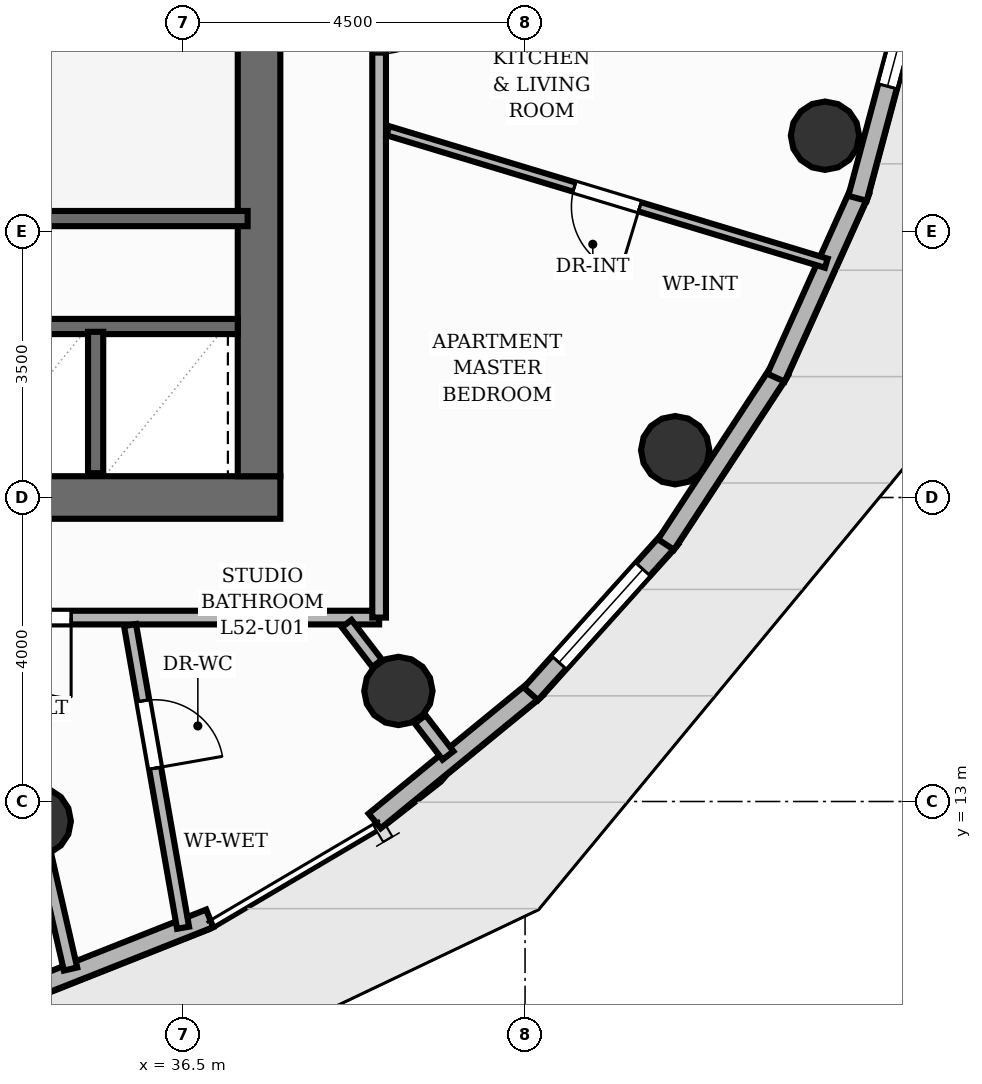
"""IFC4 building model, lengths in metres.
Left out: names, types, materials, properties, quantities, classifications, styles, units other than length and angle.
Written with IfcOpenShell. Run it as: python <this file> out.ifc"""

import sys

from ifc_helpers import new_model, si_unit, direction, frame, frame_2d, origin, origin_2d, place, context, subcontext, project, spatial, rectangle, circle, extrude, element, fill, save


model = new_model("IFC4")
c1 = context("Model", 3, precision=1e-05, world=origin(), true_north=direction((0.0, 1.0)))
c2 = subcontext(c1, "Body", "Model", "MODEL_VIEW")
j1 = project(units=[si_unit("LENGTHUNIT", "METRE"), si_unit("PLANEANGLEUNIT", "RADIAN")], contexts=[c1])
p1 = place(None, origin())
s1 = spatial("IfcSite", under=j1, at=p1, CompositionType="ELEMENT")
p2 = place(p1, origin())
s2 = spatial("IfcBuilding", under=s1, at=p2, CompositionType="ELEMENT")
p3 = place(p2, frame((0.0, 0.0, 175.84)))
s3 = spatial("IfcBuildingStorey", under=s2, at=p3, CompositionType="ELEMENT", Elevation=175.84)
p4 = place(p3, frame((26.22, 17.0, 0.0), z_axis=(0.0, 0.0, 1.0), x_axis=(1.0, 0.0, 0.0)))
e1 = element("IfcWall", 1, at=p4, inside=s3, PredefinedType="SHEAR", context=c2, shape_type="SweptSolid", body=[
    extrude(rectangle(XDim=11.56, YDim=0.56, at=frame_2d((5.78, 0.0))), origin(), (0.0, 0.0, 1.0), 3.2),
])
p5 = place(p4, frame((2.28, 0.0, 0.0)))
e2 = element("IfcOpeningElement", 2, at=p5, cuts=e1, PredefinedType="OPENING", context=c2, shape_type="SweptSolid", body=[
    extrude(rectangle(XDim=1.1, YDim=2.15, at=frame_2d((0.55, 1.075))), frame((0.0, 0.29, 0.0), z_axis=(0.0, -1.0, 0.0), x_axis=(1.0, 0.0, 0.0)), (0.0, 0.0, 1.0), 0.58),
])
p6 = place(p4, frame((5.83, 0.0, 0.0)))
e3 = element("IfcOpeningElement", 3, at=p6, cuts=e1, PredefinedType="OPENING", context=c2, shape_type="SweptSolid", body=[
    extrude(rectangle(XDim=0.9, YDim=2.1, at=frame_2d((0.45, 1.05))), frame((0.0, 0.29, 0.0), z_axis=(0.0, -1.0, 0.0), x_axis=(1.0, 0.0, 0.0)), (0.0, 0.0, 1.0), 0.58),
])
p7 = place(p3, frame((37.5, 17.28, 0.0), z_axis=(0.0, 0.0, 1.0), x_axis=(0.0, 1.0, 0.0)))
e4 = element("IfcWall", 4, at=p7, inside=s3, PredefinedType="SHEAR", context=c2, shape_type="SweptSolid", body=[
    extrude(rectangle(XDim=13.44, YDim=0.56, at=frame_2d((6.72, 0.0))), origin(), (0.0, 0.0, 1.0), 3.2),
])
for number, where, z_axis, x_axis in (
    (5, (34.575, 12.74, 0.0), (0.0, 0.0, 1.0), (1.0, 0.0, 0.0)),
    (6, (39.333, 14.455, 0.0), (0.0, 0.0, 1.0), (1.0, 0.0, 0.0)),
    (7, (42.975, 17.622, 0.0), (0.0, 0.0, 1.0), (1.0, 0.0, 0.0)),
    (8, (44.946, 21.76, 0.0), (0.0, 0.0, 1.0), (1.0, 0.0, 0.0)),
):
    element("IfcColumn", number, at=place(p3, frame(where, z_axis=z_axis, x_axis=x_axis)), inside=s3, PredefinedType="COLUMN", context=c2, shape_type="SweptSolid", body=[
        extrude(circle(Radius=0.45, at=origin_2d()), origin(), (0.0, 0.0, 1.0), 3.2),
    ])
p8 = place(p3, frame((36.851, 11.462, 0.0), z_axis=(0.0, 0.0, 1.0), x_axis=(-0.929693178164, -0.368334894459, 0.0)))
e9 = element("IfcWall", 9, at=p8, inside=s3, PredefinedType="SOLIDWALL", context=c2, shape_type="SweptSolid", body=[
    extrude(rectangle(XDim=2.702, YDim=0.25, at=frame_2d((1.351, 0.0))), origin(), (0.0, 0.0, 1.0), 2.96),
])
p9 = place(p3, frame((41.155, 14.492, 0.0), z_axis=(0.0, 0.0, 1.0), x_axis=(-0.773491700486, -0.633806428872, 0.0)))
e10 = element("IfcWall", 10, at=p9, inside=s3, PredefinedType="SOLIDWALL", context=c2, shape_type="SweptSolid", body=[
    extrude(rectangle(XDim=2.758, YDim=0.25, at=frame_2d((1.379, 0.0))), origin(), (0.0, 0.0, 1.0), 2.96),
])
p10 = place(p3, frame((42.921, 16.468, 0.0), z_axis=(0.0, 0.0, 1.0), x_axis=(-0.668764193685, -0.743474581438, 0.0)))
e11 = element("IfcWall", 11, at=p10, inside=s3, PredefinedType="SOLIDWALL", context=c2, shape_type="SweptSolid", body=[
    extrude(rectangle(XDim=2.758, YDim=0.25, at=frame_2d((1.379, 0.0))), origin(), (0.0, 0.0, 1.0), 2.96),
])
p11 = place(p10, frame((0.554, 0.0, 0.85)))
e12 = element("IfcOpeningElement", 12, at=p11, cuts=e11, PredefinedType="OPENING", context=c2, shape_type="SweptSolid", body=[
    extrude(rectangle(XDim=1.65, YDim=1.55, at=frame_2d((0.825, 0.775))), frame((0.0, 0.135, 0.0), z_axis=(0.0, -1.0, 0.0), x_axis=(1.0, 0.0, 0.0)), (0.0, 0.0, 1.0), 0.27),
])
p12 = place(p3, frame((44.354, 18.673, 0.0), z_axis=(0.0, 0.0, 1.0), x_axis=(-0.547664848596, -0.83669780304, 0.0)))
e13 = element("IfcWall", 13, at=p12, inside=s3, PredefinedType="SOLIDWALL", context=c2, shape_type="SweptSolid", body=[
    extrude(rectangle(XDim=2.739, YDim=0.25, at=frame_2d((1.369, 0.0))), origin(), (0.0, 0.0, 1.0), 2.96),
])
p13 = place(p3, frame((45.411, 21.04, 0.0), z_axis=(0.0, 0.0, 1.0), x_axis=(-0.410736648959, -0.911754026699, 0.0)))
e14 = element("IfcWall", 14, at=p13, inside=s3, PredefinedType="SOLIDWALL", context=c2, shape_type="SweptSolid", body=[
    extrude(rectangle(XDim=2.701, YDim=0.25, at=frame_2d((1.351, 0.0))), origin(), (0.0, 0.0, 1.0), 2.96),
])
p14 = place(p3, frame((46.06, 23.497, 0.0), z_axis=(0.0, 0.0, 1.0), x_axis=(-0.258688517816, -0.965960791518, 0.0)))
e15 = element("IfcWall", 15, at=p14, inside=s3, PredefinedType="SOLIDWALL", context=c2, shape_type="SweptSolid", body=[
    extrude(rectangle(XDim=2.651, YDim=0.25, at=frame_2d((1.326, 0.0))), origin(), (0.0, 0.0, 1.0), 2.96),
])
p15 = place(p14, frame((0.175, 0.0, 0.85)))
e16 = element("IfcOpeningElement", 16, at=p15, cuts=e15, PredefinedType="OPENING", context=c2, shape_type="SweptSolid", body=[
    extrude(rectangle(XDim=0.95, YDim=1.45, at=frame_2d((0.475, 0.725))), frame((0.0, 0.135, 0.0), z_axis=(0.0, -1.0, 0.0), x_axis=(1.0, 0.0, 0.0)), (0.0, 0.0, 1.0), 0.27),
])
p16 = place(p3, frame((34.11, 20.67, 0.0), z_axis=(0.0, 0.0, 1.0), x_axis=(1.0, 0.0, 0.0)))
e17 = element("IfcWall", 17, at=p16, inside=s3, PredefinedType="SHEAR", context=c2, shape_type="SweptSolid", body=[
    extrude(rectangle(XDim=3.24, YDim=0.2, at=frame_2d((1.62, 0.0))), origin(), (0.0, 0.0, 1.0), 3.2),
])
p17 = place(p3, frame((33.5, 19.25, 0.0), z_axis=(0.0, 0.0, 1.0), x_axis=(1.0, 0.0, 0.0)))
e18 = element("IfcWall", 18, at=p17, inside=s3, PredefinedType="SHEAR", context=c2, shape_type="SweptSolid", body=[
    extrude(rectangle(XDim=3.72, YDim=0.2, at=frame_2d((1.86, 0.0))), origin(), (0.0, 0.0, 1.0), 3.2),
])
p18 = place(p3, frame((35.35, 17.32, 0.0), z_axis=(0.0, 0.0, 1.0), x_axis=(0.0, 1.0, 0.0)))
e19 = element("IfcWall", 19, at=p18, inside=s3, PredefinedType="SHEAR", context=c2, shape_type="SweptSolid", body=[
    extrude(rectangle(XDim=1.86, YDim=0.2, at=frame_2d((0.93, 0.0))), origin(), (0.0, 0.0, 1.0), 3.2),
])
p19 = place(p3, frame((34.68, 12.282, 0.0), z_axis=(0.0, 0.0, 1.0), x_axis=(0.222976920769, -0.974823723965, 0.0)))
e20 = element("IfcWall", 20, at=p19, inside=s3, PredefinedType="PARTITIONING", context=c2, shape_type="SweptSolid", body=[
    extrude(rectangle(XDim=1.525, YDim=0.18, at=frame_2d((0.763, 0.0))), origin(), (0.0, 0.0, 1.0), 2.403),
])
p20 = place(p3, frame((39.62, 14.082, 0.0), z_axis=(0.0, 0.0, 1.0), x_axis=(0.609062571598, -0.793122174623, 0.0)))
e21 = element("IfcWall", 21, at=p20, inside=s3, PredefinedType="PARTITIONING", context=c2, shape_type="SweptSolid", body=[
    extrude(rectangle(XDim=0.601, YDim=0.18, at=frame_2d((0.3, 0.0))), origin(), (0.0, 0.0, 1.0), 2.403),
])
p21 = place(p3, frame((39.08, 15.42, 0.0), z_axis=(0.0, 0.0, 1.0), x_axis=(-1.0, 0.0, 0.0)))
e22 = element("IfcWall", 22, at=p21, inside=s3, PredefinedType="PARTITIONING", context=c2, shape_type="SweptSolid", body=[
    extrude(rectangle(XDim=5.88, YDim=0.18, at=frame_2d((2.94, 0.0))), origin(), (0.0, 0.0, 1.0), 2.955),
])
p22 = place(p21, frame((4.052, 0.0, 0.0)))
e23 = element("IfcOpeningElement", 23, at=p22, cuts=e22, PredefinedType="OPENING", context=c2, shape_type="SweptSolid", body=[
    extrude(rectangle(XDim=1.05, YDim=2.15, at=frame_2d((0.525, 1.075))), frame((0.0, 0.1, 0.0), z_axis=(0.0, -1.0, 0.0), x_axis=(1.0, 0.0, 0.0)), (0.0, 0.0, 1.0), 0.2),
])
p23 = place(p3, frame((39.08, 28.156, 0.0), z_axis=(0.0, 0.0, 1.0), x_axis=(0.0, -1.0, 0.0)))
e24 = element("IfcWall", 24, at=p23, inside=s3, PredefinedType="PARTITIONING", context=c2, shape_type="SweptSolid", body=[
    extrude(rectangle(XDim=12.736, YDim=0.18, at=frame_2d((6.368, 0.0))), origin(), (0.0, 0.0, 1.0), 2.955),
])
p24 = place(p23, frame((4.269, 0.0, 0.0)))
e25 = element("IfcOpeningElement", 25, at=p24, cuts=e24, PredefinedType="OPENING", context=c2, shape_type="SweptSolid", body=[
    extrude(rectangle(XDim=1.05, YDim=2.15, at=frame_2d((0.525, 1.075))), frame((0.0, 0.1, 0.0), z_axis=(0.0, -1.0, 0.0), x_axis=(1.0, 0.0, 0.0)), (0.0, 0.0, 1.0), 0.2),
])
p25 = place(p3, frame((35.802, 15.322, 0.0), z_axis=(0.0, 0.0, 1.0), x_axis=(0.172579535558, -0.98499558573, 0.0)))
e26 = element("IfcWall", 26, at=p25, inside=s3, PredefinedType="PLUMBINGWALL", context=c2, shape_type="SweptSolid", body=[
    extrude(rectangle(XDim=4.043, YDim=0.16, at=frame_2d((2.021, 0.0))), origin(), (0.0, 0.0, 1.0), 2.692),
])
p26 = place(p25, frame((1.011, 0.0, 0.0)))
e27 = element("IfcOpeningElement", 27, at=p26, cuts=e26, PredefinedType="OPENING", context=c2, shape_type="SweptSolid", body=[
    extrude(rectangle(XDim=0.9, YDim=2.1, at=frame_2d((0.45, 1.05))), frame((0.0, 0.09, 0.0), z_axis=(0.0, -1.0, 0.0), x_axis=(1.0, 0.0, 0.0)), (0.0, 0.0, 1.0), 0.18),
])
p27 = place(p3, frame((38.653, 15.341, 0.0), z_axis=(0.0, 0.0, 1.0), x_axis=(0.609101063055, -0.79309261438, 0.0)))
e28 = element("IfcWall", 28, at=p27, inside=s3, PredefinedType="PLUMBINGWALL", context=c2, shape_type="SweptSolid", body=[
    extrude(rectangle(XDim=0.658, YDim=0.16, at=frame_2d((0.329, 0.0))), origin(), (0.0, 0.0, 1.0), 2.403),
])
p28 = place(p3, frame((44.963, 20.083, 0.0), z_axis=(0.0, 0.0, 1.0), x_axis=(-0.95726021897, 0.289228064298, 0.0)))
e29 = element("IfcWall", 29, at=p28, inside=s3, PredefinedType="PARTITIONING", context=c2, shape_type="SweptSolid", body=[
    extrude(rectangle(XDim=6.026, YDim=0.125, at=frame_2d((3.013, 0.0))), origin(), (0.0, 0.0, 1.0), 2.692),
])
p29 = place(p28, frame((2.563, 0.0, 0.0)))
e30 = element("IfcOpeningElement", 30, at=p29, cuts=e29, PredefinedType="OPENING", context=c2, shape_type="SweptSolid", body=[
    extrude(rectangle(XDim=0.9, YDim=2.1, at=frame_2d((0.45, 1.05))), frame((0.0, 0.073, 0.0), z_axis=(0.0, -1.0, 0.0), x_axis=(1.0, 0.0, 0.0)), (0.0, 0.0, 1.0), 0.145),
])
p30 = place(p11, origin())
e31 = element("IfcWindow", 31, at=p30, inside=s3, PartitioningType="SINGLE_PANEL", PredefinedType="WINDOW", context=c2, shape_type="SweptSolid", body=[
    extrude(rectangle(XDim=1.65, YDim=1.55, at=frame_2d((0.825, 0.775))), frame((0.0, 0.03, 0.0), z_axis=(0.0, -1.0, 0.0), x_axis=(1.0, 0.0, 0.0)), (0.0, 0.0, 1.0), 0.06),
])
fill(e12, e31)
p31 = place(p15, origin())
e32 = element("IfcWindow", 32, at=p31, inside=s3, PartitioningType="SINGLE_PANEL", PredefinedType="WINDOW", context=c2, shape_type="SweptSolid", body=[
    extrude(rectangle(XDim=0.95, YDim=1.45, at=frame_2d((0.475, 0.725))), frame((0.0, 0.03, 0.0), z_axis=(0.0, -1.0, 0.0), x_axis=(1.0, 0.0, 0.0)), (0.0, 0.0, 1.0), 0.06),
])
fill(e16, e32)
p32 = place(p22, origin())
e33 = element("IfcDoor", 33, at=p32, inside=s3, OperationType="SINGLE_SWING_LEFT", PredefinedType="DOOR", context=c2, shape_type="SweptSolid", body=[
    extrude(rectangle(XDim=1.05, YDim=2.15, at=frame_2d((0.525, 1.075))), frame((0.0, 0.025, 0.0), z_axis=(0.0, -1.0, 0.0), x_axis=(1.0, 0.0, 0.0)), (0.0, 0.0, 1.0), 0.05),
])
fill(e23, e33)
p33 = place(p26, origin())
e34 = element("IfcDoor", 34, at=p33, inside=s3, OperationType="SINGLE_SWING_RIGHT", PredefinedType="DOOR", context=c2, shape_type="SweptSolid", body=[
    extrude(rectangle(XDim=0.9, YDim=2.1, at=frame_2d((0.45, 1.05))), frame((0.0, 0.025, 0.0), z_axis=(0.0, -1.0, 0.0), x_axis=(1.0, 0.0, 0.0)), (0.0, 0.0, 1.0), 0.05),
])
fill(e27, e34)
p34 = place(p24, origin())
e35 = element("IfcDoor", 35, at=p34, inside=s3, OperationType="SINGLE_SWING_LEFT", PredefinedType="DOOR", context=c2, shape_type="SweptSolid", body=[
    extrude(rectangle(XDim=1.05, YDim=2.15, at=frame_2d((0.525, 1.075))), frame((0.0, 0.025, 0.0), z_axis=(0.0, -1.0, 0.0), x_axis=(1.0, 0.0, 0.0)), (0.0, 0.0, 1.0), 0.05),
])
fill(e25, e35)
p35 = place(p29, origin())
e36 = element("IfcDoor", 36, at=p35, inside=s3, OperationType="SINGLE_SWING_LEFT", PredefinedType="DOOR", context=c2, shape_type="SweptSolid", body=[
    extrude(rectangle(XDim=0.9, YDim=2.1, at=frame_2d((0.45, 1.05))), frame((0.0, 0.025, 0.0), z_axis=(0.0, -1.0, 0.0), x_axis=(1.0, 0.0, 0.0)), (0.0, 0.0, 1.0), 0.05),
])
fill(e30, e36)
save(model, sys.argv[1])
